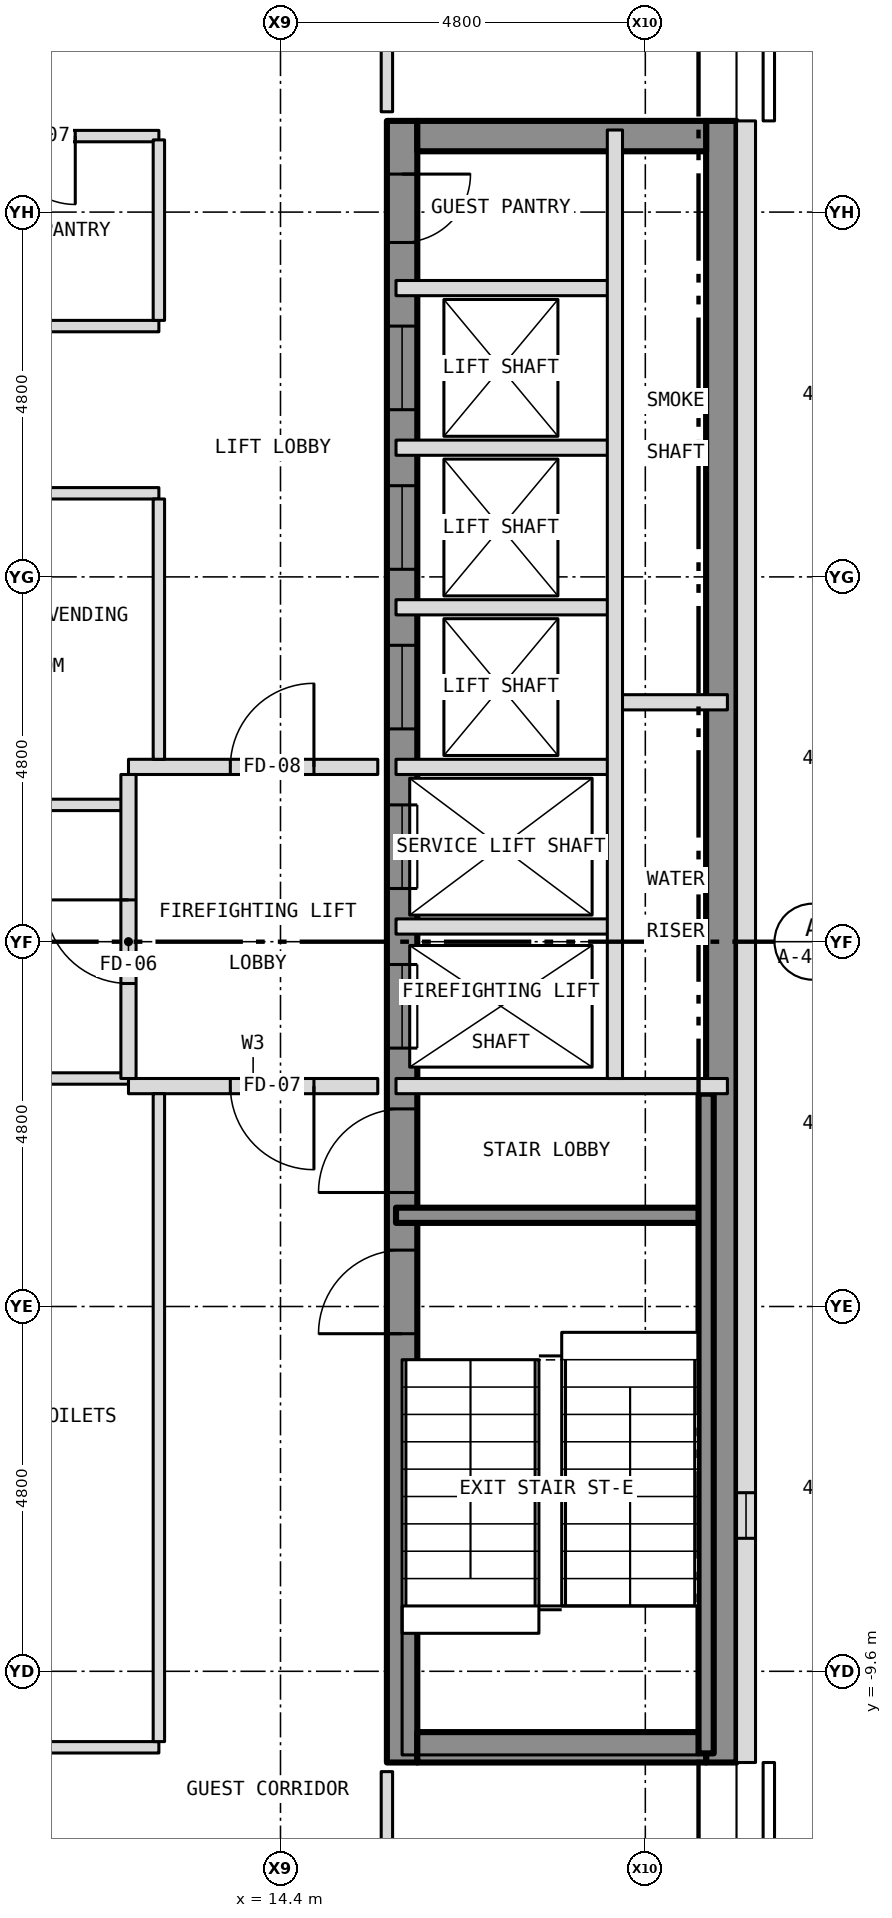
"""IFC4 building model, lengths in metres.
Left out: names, types, materials, properties, quantities, classifications, styles, units other than length and angle.
Written with IfcOpenShell. Run it as: python <this file> out.ifc"""

import sys

from ifc_helpers import new_model, si_unit, direction, frame, frame_2d, origin, place, context, subcontext, project, spatial, rectangle, extrude, element, fill, save


model = new_model("IFC4")
c1 = context("Model", 3, precision=1e-05, world=origin(), true_north=direction((0.0, 1.0)))
c2 = subcontext(c1, "Body", "Model", "MODEL_VIEW")
j1 = project(units=[si_unit("LENGTHUNIT", "METRE"), si_unit("PLANEANGLEUNIT", "RADIAN")], contexts=[c1])
p1 = place(None, origin())
s1 = spatial("IfcSite", under=j1, at=p1, CompositionType="ELEMENT")
p2 = place(p1, origin())
s2 = spatial("IfcBuilding", under=s1, at=p2, CompositionType="ELEMENT")
p3 = place(p2, frame((0.0, 0.0, 229.5)))
s3 = spatial("IfcBuildingStorey", under=s2, at=p3, CompositionType="ELEMENT", Elevation=229.5)
p4 = place(p3, frame((16.0, -10.8, 0.0), z_axis=(0.0, 0.0, 1.0), x_axis=(0.0, 1.0, 0.0)))
e1 = element("IfcWall", 1, at=p4, inside=s3, PredefinedType="SHEAR", context=c2, shape_type="SweptSolid", body=[
    extrude(rectangle(XDim=21.6, YDim=0.4, at=frame_2d((10.8, 0.0))), origin(), (0.0, 0.0, 1.0), 3.25),
])
p5 = place(p4, frame((9.4, 0.0, 0.0)))
e2 = element("IfcOpeningElement", 2, at=p5, cuts=e1, PredefinedType="OPENING", context=c2, shape_type="SweptSolid", body=[
    extrude(rectangle(XDim=1.1, YDim=2.1, at=frame_2d((0.55, 1.05))), frame((0.0, 0.212, 0.0), z_axis=(0.0, -1.0, 0.0), x_axis=(1.0, 0.0, 0.0)), (0.0, 0.0, 1.0), 0.424),
])
p6 = place(p4, frame((11.5, 0.0, 0.0)))
e3 = element("IfcOpeningElement", 3, at=p6, cuts=e1, PredefinedType="OPENING", context=c2, shape_type="SweptSolid", body=[
    extrude(rectangle(XDim=1.1, YDim=2.1, at=frame_2d((0.55, 1.05))), frame((0.0, 0.212, 0.0), z_axis=(0.0, -1.0, 0.0), x_axis=(1.0, 0.0, 0.0)), (0.0, 0.0, 1.0), 0.424),
])
p7 = place(p4, frame((13.6, 0.0, 0.0)))
e4 = element("IfcOpeningElement", 4, at=p7, cuts=e1, PredefinedType="OPENING", context=c2, shape_type="SweptSolid", body=[
    extrude(rectangle(XDim=1.1, YDim=2.1, at=frame_2d((0.55, 1.05))), frame((0.0, 0.212, 0.0), z_axis=(0.0, -1.0, 0.0), x_axis=(1.0, 0.0, 0.0)), (0.0, 0.0, 1.0), 0.424),
])
p8 = place(p4, frame((15.7, 0.0, 0.0)))
e5 = element("IfcOpeningElement", 5, at=p8, cuts=e1, PredefinedType="OPENING", context=c2, shape_type="SweptSolid", body=[
    extrude(rectangle(XDim=1.1, YDim=2.1, at=frame_2d((0.55, 1.05))), frame((0.0, 0.212, 0.0), z_axis=(0.0, -1.0, 0.0), x_axis=(1.0, 0.0, 0.0)), (0.0, 0.0, 1.0), 0.424),
])
p9 = place(p4, frame((17.8, 0.0, 0.0)))
e6 = element("IfcOpeningElement", 6, at=p9, cuts=e1, PredefinedType="OPENING", context=c2, shape_type="SweptSolid", body=[
    extrude(rectangle(XDim=1.1, YDim=2.1, at=frame_2d((0.55, 1.05))), frame((0.0, 0.212, 0.0), z_axis=(0.0, -1.0, 0.0), x_axis=(1.0, 0.0, 0.0)), (0.0, 0.0, 1.0), 0.424),
])
p10 = place(p4, frame((5.642, 0.0, 0.0)))
e7 = element("IfcOpeningElement", 7, at=p10, cuts=e1, PredefinedType="OPENING", context=c2, shape_type="SweptSolid", body=[
    extrude(rectangle(XDim=1.1, YDim=2.1, at=frame_2d((0.55, 1.05))), frame((0.0, 0.212, 0.0), z_axis=(0.0, -1.0, 0.0), x_axis=(1.0, 0.0, 0.0)), (0.0, 0.0, 1.0), 0.424),
])
p11 = place(p4, frame((7.5, 0.0, 0.0)))
e8 = element("IfcOpeningElement", 8, at=p11, cuts=e1, PredefinedType="OPENING", context=c2, shape_type="SweptSolid", body=[
    extrude(rectangle(XDim=1.1, YDim=2.1, at=frame_2d((0.55, 1.05))), frame((0.0, 0.212, 0.0), z_axis=(0.0, -1.0, 0.0), x_axis=(1.0, 0.0, 0.0)), (0.0, 0.0, 1.0), 0.424),
])
p12 = place(p4, frame((20.0, 0.0, 0.0)))
e9 = element("IfcOpeningElement", 9, at=p12, cuts=e1, PredefinedType="OPENING", context=c2, shape_type="SweptSolid", body=[
    extrude(rectangle(XDim=0.9, YDim=2.1, at=frame_2d((0.45, 1.05))), frame((0.0, 0.212, 0.0), z_axis=(0.0, -1.0, 0.0), x_axis=(1.0, 0.0, 0.0)), (0.0, 0.0, 1.0), 0.424),
])
p13 = place(p3, frame((20.2, -10.8, 0.0), z_axis=(0.0, 0.0, 1.0), x_axis=(0.0, 1.0, 0.0)))
e10 = element("IfcWall", 10, at=p13, inside=s3, PredefinedType="SHEAR", context=c2, shape_type="SweptSolid", body=[
    extrude(rectangle(XDim=21.6, YDim=0.4, at=frame_2d((10.8, 0.0))), origin(), (0.0, 0.0, 1.0), 3.25),
])
for number, where, z_axis, x_axis in (
    (11, (16.2, 10.6, 0.0), (0.0, 0.0, 1.0), (1.0, 0.0, 0.0)),
    (12, (16.2, -10.6, 0.0), (0.0, 0.0, 1.0), (1.0, 0.0, 0.0)),
):
    element("IfcWall", number, at=place(p3, frame(where, z_axis=z_axis, x_axis=x_axis)), inside=s3, PredefinedType="SHEAR", context=c2, shape_type="SweptSolid", body=[
        extrude(rectangle(XDim=3.8, YDim=0.4, at=frame_2d((1.9, 0.0))), origin(), (0.0, 0.0, 1.0), 3.25),
    ])
p14 = place(p3, frame((20.525, -10.8, 0.0), z_axis=(0.0, 0.0, 1.0), x_axis=(0.0, 1.0, 0.0)))
e13 = element("IfcWall", 13, at=p14, inside=s3, PredefinedType="SOLIDWALL", context=c2, shape_type="SweptSolid", body=[
    extrude(rectangle(XDim=21.6, YDim=0.25, at=frame_2d((10.8, 0.0))), origin(), (0.0, 0.0, 1.0), 3.5),
])
p15 = place(p14, frame((2.95, 0.0, 1.0)))
e14 = element("IfcOpeningElement", 14, at=p15, cuts=e13, PredefinedType="OPENING", context=c2, shape_type="SweptSolid", body=[
    extrude(rectangle(XDim=0.6, YDim=1.5, at=frame_2d((0.3, 0.75))), frame((0.0, 0.137, 0.0), z_axis=(0.0, -1.0, 0.0), x_axis=(1.0, 0.0, 0.0)), (0.0, 0.0, 1.0), 0.274),
])
p16 = place(p3, frame((9.7, -10.6, 0.0), z_axis=(0.0, 0.0, 1.0), x_axis=(1.0, 0.0, 0.0)))
e15 = element("IfcWall", 15, at=p16, inside=s3, PredefinedType="PARTITIONING", context=c2, shape_type="SweptSolid", body=[
    extrude(rectangle(XDim=3.1, YDim=0.15, at=frame_2d((1.55, 0.0))), origin(), (0.0, 0.0, 1.0), 3.35),
])
p17 = place(p3, frame((15.92, -3.6, 0.0), z_axis=(0.0, 0.0, 1.0), x_axis=(1.0, 0.0, 0.0)))
e16 = element("IfcWall", 16, at=p17, inside=s3, PredefinedType="SHEAR", context=c2, shape_type="SweptSolid", body=[
    extrude(rectangle(XDim=4.08, YDim=0.2, at=frame_2d((2.04, 0.0))), origin(), (0.0, 0.0, 1.0), 3.25),
])
p18 = place(p3, frame((12.4, -1.9, 0.0), z_axis=(0.0, 0.0, 1.0), x_axis=(1.0, 0.0, 0.0)))
e17 = element("IfcWall", 17, at=p18, inside=s3, PredefinedType="PARTITIONING", context=c2, shape_type="SweptSolid", body=[
    extrude(rectangle(XDim=3.28, YDim=0.2, at=frame_2d((1.64, 0.0))), origin(), (0.0, 0.0, 1.0), 3.35),
])
p19 = place(p18, frame((1.34, 0.0, 0.0)))
e18 = element("IfcOpeningElement", 18, at=p19, cuts=e17, PredefinedType="OPENING", context=c2, shape_type="SweptSolid", body=[
    extrude(rectangle(XDim=1.1, YDim=2.1, at=frame_2d((0.55, 1.05))), frame((0.0, 0.112, 0.0), z_axis=(0.0, -1.0, 0.0), x_axis=(1.0, 0.0, 0.0)), (0.0, 0.0, 1.0), 0.224),
])
p20 = place(p3, frame((15.92, -1.9, 0.0), z_axis=(0.0, 0.0, 1.0), x_axis=(1.0, 0.0, 0.0)))
e19 = element("IfcWall", 19, at=p20, inside=s3, PredefinedType="PARTITIONING", context=c2, shape_type="SweptSolid", body=[
    extrude(rectangle(XDim=4.36, YDim=0.2, at=frame_2d((2.18, 0.0))), origin(), (0.0, 0.0, 1.0), 3.25),
])
p21 = place(p3, frame((9.7, -1.8, 0.0), z_axis=(0.0, 0.0, 1.0), x_axis=(1.0, 0.0, 0.0)))
e20 = element("IfcWall", 20, at=p21, inside=s3, PredefinedType="PARTITIONING", context=c2, shape_type="SweptSolid", body=[
    extrude(rectangle(XDim=2.7, YDim=0.15, at=frame_2d((1.35, 0.0))), origin(), (0.0, 0.0, 1.0), 3.35),
])
p22 = place(p3, frame((15.92, 0.2, 0.0), z_axis=(0.0, 0.0, 1.0), x_axis=(1.0, 0.0, 0.0)))
e21 = element("IfcWall", 21, at=p22, inside=s3, PredefinedType="PARTITIONING", context=c2, shape_type="SweptSolid", body=[
    extrude(rectangle(XDim=2.88, YDim=0.2, at=frame_2d((1.44, 0.0))), origin(), (0.0, 0.0, 1.0), 3.25),
])
p23 = place(p3, frame((9.7, 1.8, 0.0), z_axis=(0.0, 0.0, 1.0), x_axis=(1.0, 0.0, 0.0)))
e22 = element("IfcWall", 22, at=p23, inside=s3, PredefinedType="PARTITIONING", context=c2, shape_type="SweptSolid", body=[
    extrude(rectangle(XDim=2.7, YDim=0.15, at=frame_2d((1.35, 0.0))), origin(), (0.0, 0.0, 1.0), 3.35),
])
p24 = place(p3, frame((12.4, 2.3, 0.0), z_axis=(0.0, 0.0, 1.0), x_axis=(1.0, 0.0, 0.0)))
e23 = element("IfcWall", 23, at=p24, inside=s3, PredefinedType="PARTITIONING", context=c2, shape_type="SweptSolid", body=[
    extrude(rectangle(XDim=3.28, YDim=0.2, at=frame_2d((1.64, 0.0))), origin(), (0.0, 0.0, 1.0), 3.35),
])
p25 = place(p24, frame((1.34, 0.0, 0.0)))
e24 = element("IfcOpeningElement", 24, at=p25, cuts=e23, PredefinedType="OPENING", context=c2, shape_type="SweptSolid", body=[
    extrude(rectangle(XDim=1.1, YDim=2.1, at=frame_2d((0.55, 1.05))), frame((0.0, 0.112, 0.0), z_axis=(0.0, -1.0, 0.0), x_axis=(1.0, 0.0, 0.0)), (0.0, 0.0, 1.0), 0.224),
])
p26 = place(p3, frame((15.92, 2.3, 0.0), z_axis=(0.0, 0.0, 1.0), x_axis=(1.0, 0.0, 0.0)))
e25 = element("IfcWall", 25, at=p26, inside=s3, PredefinedType="PARTITIONING", context=c2, shape_type="SweptSolid", body=[
    extrude(rectangle(XDim=2.88, YDim=0.2, at=frame_2d((1.44, 0.0))), origin(), (0.0, 0.0, 1.0), 3.25),
])
p27 = place(p3, frame((18.8, 3.15, 0.0), z_axis=(0.0, 0.0, 1.0), x_axis=(1.0, 0.0, 0.0)))
e26 = element("IfcWall", 26, at=p27, inside=s3, PredefinedType="PARTITIONING", context=c2, shape_type="SweptSolid", body=[
    extrude(rectangle(XDim=1.48, YDim=0.2, at=frame_2d((0.74, 0.0))), origin(), (0.0, 0.0, 1.0), 3.25),
])
p28 = place(p3, frame((15.92, 4.4, 0.0), z_axis=(0.0, 0.0, 1.0), x_axis=(1.0, 0.0, 0.0)))
e27 = element("IfcWall", 27, at=p28, inside=s3, PredefinedType="PARTITIONING", context=c2, shape_type="SweptSolid", body=[
    extrude(rectangle(XDim=2.88, YDim=0.2, at=frame_2d((1.44, 0.0))), origin(), (0.0, 0.0, 1.0), 3.25),
])
p29 = place(p3, frame((9.7, 5.9, 0.0), z_axis=(0.0, 0.0, 1.0), x_axis=(1.0, 0.0, 0.0)))
e28 = element("IfcWall", 28, at=p29, inside=s3, PredefinedType="PARTITIONING", context=c2, shape_type="SweptSolid", body=[
    extrude(rectangle(XDim=3.1, YDim=0.15, at=frame_2d((1.55, 0.0))), origin(), (0.0, 0.0, 1.0), 3.35),
])
p30 = place(p3, frame((15.92, 6.5, 0.0), z_axis=(0.0, 0.0, 1.0), x_axis=(1.0, 0.0, 0.0)))
e29 = element("IfcWall", 29, at=p30, inside=s3, PredefinedType="PARTITIONING", context=c2, shape_type="SweptSolid", body=[
    extrude(rectangle(XDim=2.88, YDim=0.2, at=frame_2d((1.44, 0.0))), origin(), (0.0, 0.0, 1.0), 3.25),
])
p31 = place(p3, frame((9.7, 8.1, 0.0), z_axis=(0.0, 0.0, 1.0), x_axis=(1.0, 0.0, 0.0)))
e30 = element("IfcWall", 30, at=p31, inside=s3, PredefinedType="PARTITIONING", context=c2, shape_type="SweptSolid", body=[
    extrude(rectangle(XDim=3.1, YDim=0.15, at=frame_2d((1.55, 0.0))), origin(), (0.0, 0.0, 1.0), 3.35),
])
p32 = place(p3, frame((15.92, 8.6, 0.0), z_axis=(0.0, 0.0, 1.0), x_axis=(1.0, 0.0, 0.0)))
e31 = element("IfcWall", 31, at=p32, inside=s3, PredefinedType="PARTITIONING", context=c2, shape_type="SweptSolid", body=[
    extrude(rectangle(XDim=2.88, YDim=0.2, at=frame_2d((1.44, 0.0))), origin(), (0.0, 0.0, 1.0), 3.25),
])
p33 = place(p3, frame((9.7, 10.6, 0.0), z_axis=(0.0, 0.0, 1.0), x_axis=(1.0, 0.0, 0.0)))
e32 = element("IfcWall", 32, at=p33, inside=s3, PredefinedType="PARTITIONING", context=c2, shape_type="SweptSolid", body=[
    extrude(rectangle(XDim=3.1, YDim=0.15, at=frame_2d((1.55, 0.0))), origin(), (0.0, 0.0, 1.0), 3.35),
])
p34 = place(p33, frame((1.1, 0.0, 0.0)))
e33 = element("IfcOpeningElement", 33, at=p34, cuts=e32, PredefinedType="OPENING", context=c2, shape_type="SweptSolid", body=[
    extrude(rectangle(XDim=0.9, YDim=2.1, at=frame_2d((0.45, 1.05))), frame((0.0, 0.087, 0.0), z_axis=(0.0, -1.0, 0.0), x_axis=(1.0, 0.0, 0.0)), (0.0, 0.0, 1.0), 0.174),
])
p35 = place(p3, frame((12.4, -1.8, 0.0), z_axis=(0.0, 0.0, 1.0), x_axis=(0.0, 1.0, 0.0)))
e34 = element("IfcWall", 34, at=p35, inside=s3, PredefinedType="PARTITIONING", context=c2, shape_type="SweptSolid", body=[
    extrude(rectangle(XDim=4.0, YDim=0.2, at=frame_2d((2.0, 0.0))), origin(), (0.0, 0.0, 1.0), 3.35),
])
p36 = place(p35, frame((1.25, 0.0, 0.0)))
e35 = element("IfcOpeningElement", 35, at=p36, cuts=e34, PredefinedType="OPENING", context=c2, shape_type="SweptSolid", body=[
    extrude(rectangle(XDim=1.1, YDim=2.1, at=frame_2d((0.55, 1.05))), frame((0.0, 0.112, 0.0), z_axis=(0.0, -1.0, 0.0), x_axis=(1.0, 0.0, 0.0)), (0.0, 0.0, 1.0), 0.224),
])
p37 = place(p3, frame((12.8, -10.525, 0.0), z_axis=(0.0, 0.0, 1.0), x_axis=(0.0, 1.0, 0.0)))
e36 = element("IfcWall", 36, at=p37, inside=s3, PredefinedType="PARTITIONING", context=c2, shape_type="SweptSolid", body=[
    extrude(rectangle(XDim=8.525, YDim=0.15, at=frame_2d((4.262, 0.0))), origin(), (0.0, 0.0, 1.0), 3.35),
])
p38 = place(p3, frame((12.8, 2.4, 0.0), z_axis=(0.0, 0.0, 1.0), x_axis=(0.0, 1.0, 0.0)))
e37 = element("IfcWall", 37, at=p38, inside=s3, PredefinedType="PARTITIONING", context=c2, shape_type="SweptSolid", body=[
    extrude(rectangle(XDim=3.425, YDim=0.15, at=frame_2d((1.712, 0.0))), origin(), (0.0, 0.0, 1.0), 3.35),
])
p39 = place(p3, frame((12.8, 8.175, 0.0), z_axis=(0.0, 0.0, 1.0), x_axis=(0.0, 1.0, 0.0)))
e38 = element("IfcWall", 38, at=p39, inside=s3, PredefinedType="PARTITIONING", context=c2, shape_type="SweptSolid", body=[
    extrude(rectangle(XDim=2.375, YDim=0.15, at=frame_2d((1.188, 0.0))), origin(), (0.0, 0.0, 1.0), 3.35),
])
for number, where, z_axis, x_axis in (
    (39, (15.8, -12.725, 0.0), (0.0, 0.0, 1.0), (0.0, 1.0, 0.0)),
    (40, (15.8, 10.92, 0.0), (0.0, 0.0, 1.0), (0.0, 1.0, 0.0)),
):
    element("IfcWall", number, at=place(p3, frame(where, z_axis=z_axis, x_axis=x_axis)), inside=s3, PredefinedType="PARTITIONING", context=c2, shape_type="SweptSolid", body=[
        extrude(rectangle(XDim=1.805, YDim=0.15, at=frame_2d((0.903, 0.0))), origin(), (0.0, 0.0, 1.0), 3.35),
    ])
p40 = place(p3, frame((18.8, -1.8, 0.0), z_axis=(0.0, 0.0, 1.0), x_axis=(0.0, 1.0, 0.0)))
e41 = element("IfcWall", 41, at=p40, inside=s3, PredefinedType="PARTITIONING", context=c2, shape_type="SweptSolid", body=[
    extrude(rectangle(XDim=12.48, YDim=0.2, at=frame_2d((6.24, 0.0))), origin(), (0.0, 0.0, 1.0), 3.25),
])
p41 = place(p3, frame((20.0, -10.68, 0.0), z_axis=(0.0, 0.0, 1.0), x_axis=(0.0, 1.0, 0.0)))
e42 = element("IfcWall", 42, at=p41, inside=s3, PredefinedType="SHEAR", context=c2, shape_type="SweptSolid", body=[
    extrude(rectangle(XDim=8.68, YDim=0.2, at=frame_2d((4.34, 0.0))), origin(), (0.0, 0.0, 1.0), 3.25),
])
p42 = place(p15, origin())
e43 = element("IfcWindow", 43, at=p42, inside=s3, PartitioningType="SINGLE_PANEL", PredefinedType="WINDOW", context=c2, shape_type="SweptSolid", body=[
    extrude(rectangle(XDim=0.6, YDim=1.5, at=frame_2d((0.3, 0.75))), frame((0.0, -0.035, 0.0), z_axis=(0.0, -1.0, 0.0), x_axis=(1.0, 0.0, 0.0)), (0.0, 0.0, 1.0), 0.06),
])
fill(e14, e43)
p43 = place(p5, origin())
e44 = element("IfcDoor", 44, at=p43, inside=s3, OperationType="SLIDING_TO_LEFT", PredefinedType="DOOR", context=c2, shape_type="SweptSolid", body=[
    extrude(rectangle(XDim=1.1, YDim=2.1, at=frame_2d((0.55, 1.05))), frame((0.0, 0.025, 0.0), z_axis=(0.0, -1.0, 0.0), x_axis=(1.0, 0.0, 0.0)), (0.0, 0.0, 1.0), 0.05),
])
fill(e2, e44)
p44 = place(p6, origin())
e45 = element("IfcDoor", 45, at=p44, inside=s3, OperationType="SLIDING_TO_LEFT", PredefinedType="DOOR", context=c2, shape_type="SweptSolid", body=[
    extrude(rectangle(XDim=1.1, YDim=2.1, at=frame_2d((0.55, 1.05))), frame((0.0, 0.025, 0.0), z_axis=(0.0, -1.0, 0.0), x_axis=(1.0, 0.0, 0.0)), (0.0, 0.0, 1.0), 0.05),
])
fill(e3, e45)
p45 = place(p7, origin())
e46 = element("IfcDoor", 46, at=p45, inside=s3, OperationType="SLIDING_TO_LEFT", PredefinedType="DOOR", context=c2, shape_type="SweptSolid", body=[
    extrude(rectangle(XDim=1.1, YDim=2.1, at=frame_2d((0.55, 1.05))), frame((0.0, 0.025, 0.0), z_axis=(0.0, -1.0, 0.0), x_axis=(1.0, 0.0, 0.0)), (0.0, 0.0, 1.0), 0.05),
])
fill(e4, e46)
p46 = place(p8, origin())
e47 = element("IfcDoor", 47, at=p46, inside=s3, OperationType="SLIDING_TO_LEFT", PredefinedType="DOOR", context=c2, shape_type="SweptSolid", body=[
    extrude(rectangle(XDim=1.1, YDim=2.1, at=frame_2d((0.55, 1.05))), frame((0.0, 0.025, 0.0), z_axis=(0.0, -1.0, 0.0), x_axis=(1.0, 0.0, 0.0)), (0.0, 0.0, 1.0), 0.05),
])
fill(e5, e47)
p47 = place(p9, origin())
e48 = element("IfcDoor", 48, at=p47, inside=s3, OperationType="SLIDING_TO_LEFT", PredefinedType="DOOR", context=c2, shape_type="SweptSolid", body=[
    extrude(rectangle(XDim=1.1, YDim=2.1, at=frame_2d((0.55, 1.05))), frame((0.0, 0.025, 0.0), z_axis=(0.0, -1.0, 0.0), x_axis=(1.0, 0.0, 0.0)), (0.0, 0.0, 1.0), 0.05),
])
fill(e6, e48)
p48 = place(p10, origin())
e49 = element("IfcDoor", 49, at=p48, inside=s3, OperationType="SINGLE_SWING_LEFT", PredefinedType="DOOR", context=c2, shape_type="SweptSolid", body=[
    extrude(rectangle(XDim=1.1, YDim=2.1, at=frame_2d((0.55, 1.05))), frame((0.0, 0.025, 0.0), z_axis=(0.0, -1.0, 0.0), x_axis=(1.0, 0.0, 0.0)), (0.0, 0.0, 1.0), 0.05),
])
fill(e7, e49)
p49 = place(p11, origin())
e50 = element("IfcDoor", 50, at=p49, inside=s3, OperationType="SINGLE_SWING_LEFT", PredefinedType="DOOR", context=c2, shape_type="SweptSolid", body=[
    extrude(rectangle(XDim=1.1, YDim=2.1, at=frame_2d((0.55, 1.05))), frame((0.0, 0.025, 0.0), z_axis=(0.0, -1.0, 0.0), x_axis=(1.0, 0.0, 0.0)), (0.0, 0.0, 1.0), 0.05),
])
fill(e8, e50)
p50 = place(p12, origin())
e51 = element("IfcDoor", 51, at=p50, inside=s3, OperationType="SINGLE_SWING_RIGHT", PredefinedType="DOOR", context=c2, shape_type="SweptSolid", body=[
    extrude(rectangle(XDim=0.9, YDim=2.1, at=frame_2d((0.45, 1.05))), frame((0.0, 0.025, 0.0), z_axis=(0.0, -1.0, 0.0), x_axis=(1.0, 0.0, 0.0)), (0.0, 0.0, 1.0), 0.05),
])
fill(e9, e51)
p51 = place(p36, origin())
e52 = element("IfcDoor", 52, at=p51, inside=s3, OperationType="SINGLE_SWING_RIGHT", PredefinedType="DOOR", context=c2, shape_type="SweptSolid", body=[
    extrude(rectangle(XDim=1.1, YDim=2.1, at=frame_2d((0.55, 1.05))), frame((0.0, 0.025, 0.0), z_axis=(0.0, -1.0, 0.0), x_axis=(1.0, 0.0, 0.0)), (0.0, 0.0, 1.0), 0.05),
])
fill(e35, e52)
p52 = place(p19, origin())
e53 = element("IfcDoor", 53, at=p52, inside=s3, OperationType="SINGLE_SWING_RIGHT", PredefinedType="DOOR", context=c2, shape_type="SweptSolid", body=[
    extrude(rectangle(XDim=1.1, YDim=2.1, at=frame_2d((0.55, 1.05))), frame((0.0, 0.025, 0.0), z_axis=(0.0, -1.0, 0.0), x_axis=(1.0, 0.0, 0.0)), (0.0, 0.0, 1.0), 0.05),
])
fill(e18, e53)
p53 = place(p25, origin())
e54 = element("IfcDoor", 54, at=p53, inside=s3, OperationType="SINGLE_SWING_RIGHT", PredefinedType="DOOR", context=c2, shape_type="SweptSolid", body=[
    extrude(rectangle(XDim=1.1, YDim=2.1, at=frame_2d((0.55, 1.05))), frame((0.0, 0.025, 0.0), z_axis=(0.0, -1.0, 0.0), x_axis=(1.0, 0.0, 0.0)), (0.0, 0.0, 1.0), 0.05),
])
fill(e24, e54)
p54 = place(p34, origin())
e55 = element("IfcDoor", 55, at=p54, inside=s3, OperationType="SINGLE_SWING_RIGHT", PredefinedType="DOOR", context=c2, shape_type="SweptSolid", body=[
    extrude(rectangle(XDim=0.9, YDim=2.1, at=frame_2d((0.45, 1.05))), frame((0.0, 0.025, 0.0), z_axis=(0.0, -1.0, 0.0), x_axis=(1.0, 0.0, 0.0)), (0.0, 0.0, 1.0), 0.05),
])
fill(e33, e55)
save(model, sys.argv[1])
